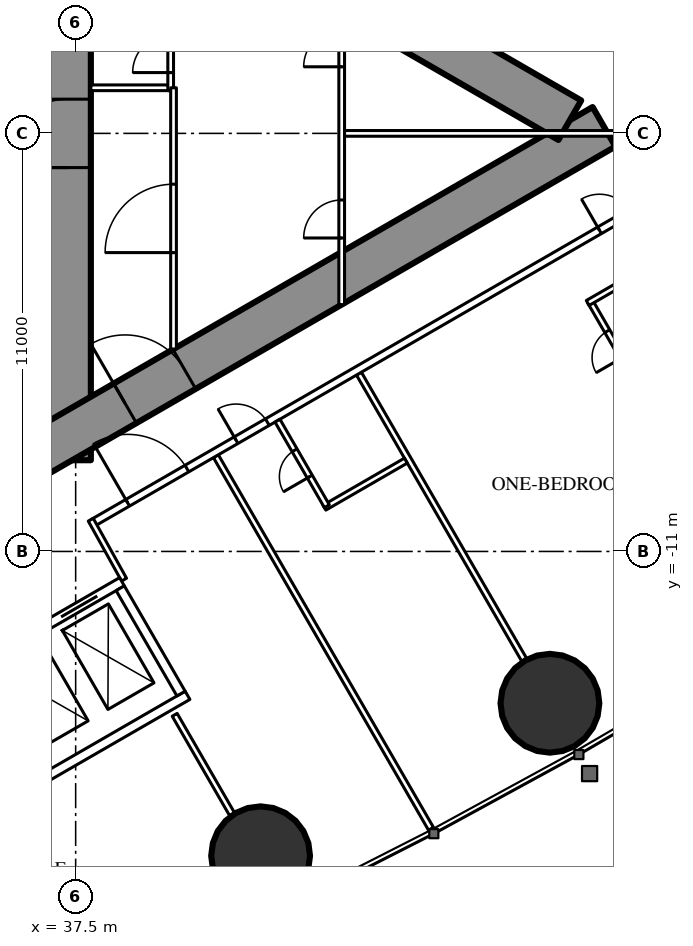
"""IFC4 building model, lengths in metres.
Left out: names, types, materials, properties, quantities, classifications, styles, units other than length and angle.
Written with IfcOpenShell. Run it as: python <this file> out.ifc"""

import sys

from ifc_helpers import new_model, si_unit, direction, frame, frame_2d, origin, origin_2d, place, context, subcontext, project, spatial, rectangle, hollow_circle, extrude, element, fill, save


model = new_model("IFC4")
c1 = context("Model", 3, precision=1e-05, world=origin(), true_north=direction((0.0, 1.0)))
c2 = subcontext(c1, "Body", "Model", "MODEL_VIEW")
j1 = project(units=[si_unit("LENGTHUNIT", "METRE"), si_unit("PLANEANGLEUNIT", "RADIAN")], contexts=[c1])
p1 = place(None, origin())
s1 = spatial("IfcSite", under=j1, at=p1, CompositionType="ELEMENT")
p2 = place(p1, origin())
s2 = spatial("IfcBuilding", under=s1, at=p2, CompositionType="ELEMENT")
p3 = place(p2, frame((0.0, 0.0, 111.6)))
s3 = spatial("IfcBuildingStorey", under=s2, at=p3, CompositionType="ELEMENT", Elevation=111.6)
for number, where, z_axis, x_axis in (
    (1, (42.366, -19.007, 0.0), (0.0, 0.0, 1.0), (1.0, 0.0, 0.0)),
    (2, (49.979, -14.994, 0.0), (0.0, 0.0, 1.0), (1.0, 0.0, 0.0)),
):
    element("IfcColumn", number, at=place(p3, frame(where, z_axis=z_axis, x_axis=x_axis)), inside=s3, PredefinedType="COLUMN", context=c2, shape_type="SweptSolid", body=[
        extrude(hollow_circle(Radius=1.3, WallThickness=0.1, at=origin_2d()), origin(), (0.0, 0.0, 1.0), 3.5),
    ])
p4 = place(p3, frame((37.3, -8.6, 0.0), z_axis=(0.0, 0.0, 1.0), x_axis=(0.0, 1.0, 0.0)))
e3 = element("IfcWall", 3, at=p4, inside=s3, PredefinedType="SHEAR", context=c2, shape_type="SweptSolid", body=[
    extrude(rectangle(XDim=17.2, YDim=1.2, at=frame_2d((8.6, 0.0))), origin(), (0.0, 0.0, 1.0), 3.5),
])
p5 = place(p4, frame((7.7, 0.0, 0.0)))
e4 = element("IfcOpeningElement", 4, at=p5, cuts=e3, PredefinedType="OPENING", context=c2, shape_type="SweptSolid", body=[
    extrude(rectangle(XDim=1.8, YDim=2.2, at=frame_2d((0.9, 1.1))), frame((0.0, 0.61, 0.0), z_axis=(0.0, -1.0, 0.0), x_axis=(1.0, 0.0, 0.0)), (0.0, 0.0, 1.0), 1.22),
])
p6 = place(p3, frame((27.2, -13.8, 0.0), z_axis=(0.0, 0.0, 1.0), x_axis=(0.866027159892, 0.499996958321, 0.0)))
e5 = element("IfcWall", 5, at=p6, inside=s3, PredefinedType="SHEAR", context=c2, shape_type="SweptSolid", body=[
    extrude(rectangle(XDim=27.947, YDim=1.2, at=frame_2d((13.973, 0.0))), origin(), (0.0, 0.0, 1.0), 3.5),
])
p7 = place(p6, frame((4.6, 0.0, 0.0)))
e6 = element("IfcOpeningElement", 6, at=p7, cuts=e5, PredefinedType="OPENING", context=c2, shape_type="SweptSolid", body=[
    extrude(rectangle(XDim=1.0, YDim=2.2, at=frame_2d((0.5, 1.1))), frame((0.0, 0.61, 0.0), z_axis=(0.0, -1.0, 0.0), x_axis=(1.0, 0.0, 0.0)), (0.0, 0.0, 1.0), 1.22),
])
p8 = place(p6, frame((13.395, 0.0, 0.0)))
e7 = element("IfcOpeningElement", 7, at=p8, cuts=e5, PredefinedType="OPENING", context=c2, shape_type="SweptSolid", body=[
    extrude(rectangle(XDim=1.8, YDim=2.2, at=frame_2d((0.9, 1.1))), frame((0.0, 0.61, 0.0), z_axis=(0.0, -1.0, 0.0), x_axis=(1.0, 0.0, 0.0)), (0.0, 0.0, 1.0), 1.22),
])
p9 = place(p3, frame((27.2, 13.8, 0.0), z_axis=(0.0, 0.0, 1.0), x_axis=(0.866024515034, -0.500001539357, 0.0)))
e8 = element("IfcWall", 8, at=p9, inside=s3, PredefinedType="SHEAR", context=c2, shape_type="SweptSolid", body=[
    extrude(rectangle(XDim=26.907, YDim=1.2, at=frame_2d((13.454, 0.0))), origin(), (0.0, 0.0, 1.0), 3.5),
])
p10 = place(p9, frame((4.6, 0.0, 0.0)))
e9 = element("IfcOpeningElement", 9, at=p10, cuts=e8, PredefinedType="OPENING", context=c2, shape_type="SweptSolid", body=[
    extrude(rectangle(XDim=1.0, YDim=2.2, at=frame_2d((0.5, 1.1))), frame((0.0, 0.61, 0.0), z_axis=(0.0, -1.0, 0.0), x_axis=(1.0, 0.0, 0.0)), (0.0, 0.0, 1.0), 1.22),
])
p11 = place(p9, frame((13.395, 0.0, 0.0)))
e10 = element("IfcOpeningElement", 10, at=p11, cuts=e8, PredefinedType="OPENING", context=c2, shape_type="SweptSolid", body=[
    extrude(rectangle(XDim=1.8, YDim=2.2, at=frame_2d((0.9, 1.1))), frame((0.0, 0.61, 0.0), z_axis=(0.0, -1.0, 0.0), x_axis=(1.0, 0.0, 0.0)), (0.0, 0.0, 1.0), 1.22),
])
p12 = place(p3, frame((41.19, -8.494, 0.0), z_axis=(0.0, 0.0, 1.0), x_axis=(0.49999258054, -0.866029687369, 0.0)))
e11 = element("IfcWall", 11, at=p12, inside=s3, PredefinedType="PARTITIONING", context=c2, shape_type="SweptSolid", body=[
    extrude(rectangle(XDim=11.318, YDim=0.15, at=frame_2d((5.659, 0.0))), origin(), (0.0, 0.0, 1.0), 3.25),
])
p13 = place(p3, frame((44.954, -6.321, 0.0), z_axis=(0.0, 0.0, 1.0), x_axis=(0.500018676722, -0.866014620505, 0.0)))
e12 = element("IfcWall", 12, at=p13, inside=s3, PredefinedType="PARTITIONING", context=c2, shape_type="SweptSolid", body=[
    extrude(rectangle(XDim=8.704, YDim=0.15, at=frame_2d((4.352, 0.0))), origin(), (0.0, 0.0, 1.0), 2.2),
])
p14 = place(p3, frame((40.105, -15.299, 0.0), z_axis=(0.0, 0.0, 1.0), x_axis=(0.499978822259, -0.866037630414, 0.0)))
e13 = element("IfcWall", 13, at=p14, inside=s3, PredefinedType="PARTITIONING", context=c2, shape_type="SweptSolid", body=[
    extrude(rectangle(XDim=3.023, YDim=0.15, at=frame_2d((1.511, 0.0))), origin(), (0.0, 0.0, 1.0), 3.25),
])
p15 = place(p3, frame((37.96, -10.243, 0.0), z_axis=(0.0, 0.0, 1.0), x_axis=(0.866026429433, 0.499998223521, 0.0)))
e14 = element("IfcWall", 14, at=p15, inside=s3, PredefinedType="PARTITIONING", context=c2, shape_type="SweptSolid", body=[
    extrude(rectangle(XDim=20.487, YDim=0.2, at=frame_2d((10.243, 0.0))), origin(), (0.0, 0.0, 1.0), 3.25),
])
p16 = place(p15, frame((4.343, 0.0, 0.0)))
e15 = element("IfcOpeningElement", 15, at=p16, cuts=e14, PredefinedType="OPENING", context=c2, shape_type="SweptSolid", body=[
    extrude(rectangle(XDim=0.95, YDim=2.2, at=frame_2d((0.475, 1.1))), frame((0.0, 0.11, 0.0), z_axis=(0.0, -1.0, 0.0), x_axis=(1.0, 0.0, 0.0)), (0.0, 0.0, 1.0), 0.22),
])
p17 = place(p15, frame((15.385, 0.0, 0.0)))
e16 = element("IfcOpeningElement", 16, at=p17, cuts=e14, PredefinedType="OPENING", context=c2, shape_type="SweptSolid", body=[
    extrude(rectangle(XDim=0.95, YDim=2.2, at=frame_2d((0.475, 1.1))), frame((0.0, 0.11, 0.0), z_axis=(0.0, -1.0, 0.0), x_axis=(1.0, 0.0, 0.0)), (0.0, 0.0, 1.0), 0.22),
])
p18 = place(p15, frame((17.085, 0.0, 0.0)))
e17 = element("IfcOpeningElement", 17, at=p18, cuts=e14, PredefinedType="OPENING", context=c2, shape_type="SweptSolid", body=[
    extrude(rectangle(XDim=0.95, YDim=2.2, at=frame_2d((0.475, 1.1))), frame((0.0, 0.11, 0.0), z_axis=(0.0, -1.0, 0.0), x_axis=(1.0, 0.0, 0.0)), (0.0, 0.0, 1.0), 0.22),
])
p19 = place(p15, frame((1.048, 0.0, 0.0)))
e18 = element("IfcOpeningElement", 18, at=p19, cuts=e14, PredefinedType="OPENING", context=c2, shape_type="SweptSolid", body=[
    extrude(rectangle(XDim=1.8, YDim=2.2, at=frame_2d((0.9, 1.1))), frame((0.0, 0.11, 0.0), z_axis=(0.0, -1.0, 0.0), x_axis=(1.0, 0.0, 0.0)), (0.0, 0.0, 1.0), 0.22),
])
p20 = place(p3, frame((38.773, -11.742, 0.0), z_axis=(0.0, 0.0, 1.0), x_axis=(-0.485528096672, 0.8742210632, 0.0)))
e19 = element("IfcWall", 19, at=p20, inside=s3, PredefinedType="PARTITIONING", context=c2, shape_type="SweptSolid", body=[
    extrude(rectangle(XDim=1.805, YDim=0.15, at=frame_2d((0.903, 0.0))), origin(), (0.0, 0.0, 1.0), 3.25),
])
p21 = place(p3, frame((44.925, 6.222, 0.0), z_axis=(0.0, 0.0, 1.0), x_axis=(0.866025590081, -0.499999677325, 0.0)))
e20 = element("IfcWall", 20, at=p21, inside=s3, PredefinedType="PARTITIONING", context=c2, shape_type="SweptSolid", body=[
    extrude(rectangle(XDim=12.324, YDim=0.2, at=frame_2d((6.162, 0.0))), origin(), (0.0, 0.0, 1.0), 3.25),
])
p22 = place(p21, frame((9.042, 0.0, 0.0)))
e21 = element("IfcOpeningElement", 21, at=p22, cuts=e20, PredefinedType="OPENING", context=c2, shape_type="SweptSolid", body=[
    extrude(rectangle(XDim=0.95, YDim=2.2, at=frame_2d((0.475, 1.1))), frame((0.0, 0.11, 0.0), z_axis=(0.0, -1.0, 0.0), x_axis=(1.0, 0.0, 0.0)), (0.0, 0.0, 1.0), 0.22),
])
p23 = place(p21, frame((7.342, 0.0, 0.0)))
e22 = element("IfcOpeningElement", 22, at=p23, cuts=e20, PredefinedType="OPENING", context=c2, shape_type="SweptSolid", body=[
    extrude(rectangle(XDim=0.95, YDim=2.2, at=frame_2d((0.475, 1.1))), frame((0.0, 0.11, 0.0), z_axis=(0.0, -1.0, 0.0), x_axis=(1.0, 0.0, 0.0)), (0.0, 0.0, 1.0), 0.22),
])
p24 = place(p21, frame((0.6, 0.0, 0.0)))
e23 = element("IfcOpeningElement", 23, at=p24, cuts=e20, PredefinedType="OPENING", context=c2, shape_type="SweptSolid", body=[
    extrude(rectangle(XDim=0.95, YDim=2.2, at=frame_2d((0.475, 1.1))), frame((0.0, 0.11, 0.0), z_axis=(0.0, -1.0, 0.0), x_axis=(1.0, 0.0, 0.0)), (0.0, 0.0, 1.0), 0.22),
])
p25 = place(p3, frame((44.045, -9.848, 0.0), z_axis=(0.0, 0.0, 1.0), x_axis=(0.866031185235, 0.4999899861, 0.0)))
e24 = element("IfcWall", 24, at=p25, inside=s3, PredefinedType="PARTITIONING", context=c2, shape_type="SweptSolid", body=[
    extrude(rectangle(XDim=2.475, YDim=0.15, at=frame_2d((1.238, 0.0))), origin(), (0.0, 0.0, 1.0), 3.25),
])
p26 = place(p3, frame((42.81, -7.559, 0.0), z_axis=(0.0, 0.0, 1.0), x_axis=(0.499936506574, -0.866062058628, 0.0)))
e25 = element("IfcWall", 25, at=p26, inside=s3, PredefinedType="PARTITIONING", context=c2, shape_type="SweptSolid", body=[
    extrude(rectangle(XDim=2.6, YDim=0.15, at=frame_2d((1.3, 0.0))), origin(), (0.0, 0.0, 1.0), 3.25),
])
p27 = place(p26, frame((0.9, 0.0, 0.0)))
e26 = element("IfcOpeningElement", 26, at=p27, cuts=e25, PredefinedType="OPENING", context=c2, shape_type="SweptSolid", body=[
    extrude(rectangle(XDim=0.8, YDim=2.2, at=frame_2d((0.4, 1.1))), frame((0.0, 0.085, 0.0), z_axis=(0.0, -1.0, 0.0), x_axis=(1.0, 0.0, 0.0)), (0.0, 0.0, 1.0), 0.17),
])
p28 = place(p3, frame((51.038, -4.425, 0.0), z_axis=(0.0, 0.0, 1.0), x_axis=(0.49997716683, -0.86603858612, 0.0)))
e27 = element("IfcWall", 27, at=p28, inside=s3, PredefinedType="PARTITIONING", context=c2, shape_type="SweptSolid", body=[
    extrude(rectangle(XDim=2.6, YDim=0.15, at=frame_2d((1.3, 0.0))), origin(), (0.0, 0.0, 1.0), 3.25),
])
p29 = place(p28, frame((0.9, 0.0, 0.0)))
e28 = element("IfcOpeningElement", 28, at=p29, cuts=e27, PredefinedType="OPENING", context=c2, shape_type="SweptSolid", body=[
    extrude(rectangle(XDim=0.8, YDim=2.2, at=frame_2d((0.4, 1.1))), frame((0.0, 0.085, 0.0), z_axis=(0.0, -1.0, 0.0), x_axis=(1.0, 0.0, 0.0)), (0.0, 0.0, 1.0), 0.17),
])
p30 = place(p3, frame((50.973, -4.462, 0.0), z_axis=(0.0, 0.0, 1.0), x_axis=(0.866031185235, 0.4999899861, 0.0)))
e29 = element("IfcWall", 29, at=p30, inside=s3, PredefinedType="PARTITIONING", context=c2, shape_type="SweptSolid", body=[
    extrude(rectangle(XDim=2.475, YDim=0.15, at=frame_2d((1.238, 0.0))), origin(), (0.0, 0.0, 1.0), 3.25),
])
p31 = place(p3, frame((37.9, 1.2, 0.0), z_axis=(0.0, 0.0, 1.0), x_axis=(1.0, 0.0, 0.0)))
e30 = element("IfcWall", 30, at=p31, inside=s3, PredefinedType="PARTITIONING", context=c2, shape_type="SweptSolid", body=[
    extrude(rectangle(XDim=2.175, YDim=0.15, at=frame_2d((1.087, 0.0))), origin(), (0.0, 0.0, 1.0), 3.25),
])
p32 = place(p3, frame((40.0, 1.125, 0.0), z_axis=(0.0, 0.0, 1.0), x_axis=(0.0, 1.0, 0.0)))
e31 = element("IfcWall", 31, at=p32, inside=s3, PredefinedType="PARTITIONING", context=c2, shape_type="SweptSolid", body=[
    extrude(rectangle(XDim=1.95, YDim=0.15, at=frame_2d((0.975, 0.0))), origin(), (0.0, 0.0, 1.0), 3.25),
])
p33 = place(p32, frame((0.475, 0.0, 0.0)))
e32 = element("IfcOpeningElement", 32, at=p33, cuts=e31, PredefinedType="OPENING", context=c2, shape_type="SweptSolid", body=[
    extrude(rectangle(XDim=1.0, YDim=2.2, at=frame_2d((0.5, 1.1))), frame((0.0, 0.085, 0.0), z_axis=(0.0, -1.0, 0.0), x_axis=(1.0, 0.0, 0.0)), (0.0, 0.0, 1.0), 0.17),
])
p34 = place(p3, frame((40.075, -5.674, 0.0), z_axis=(0.0, 0.0, 1.0), x_axis=(0.0, 1.0, 0.0)))
e33 = element("IfcWall", 33, at=p34, inside=s3, PredefinedType="PARTITIONING", context=c2, shape_type="SweptSolid", body=[
    extrude(rectangle(XDim=6.874, YDim=0.15, at=frame_2d((3.437, 0.0))), origin(), (0.0, 0.0, 1.0), 3.25),
])
p35 = place(p34, frame((2.537, 0.0, 0.0)))
e34 = element("IfcOpeningElement", 34, at=p35, cuts=e33, PredefinedType="OPENING", context=c2, shape_type="SweptSolid", body=[
    extrude(rectangle(XDim=1.8, YDim=2.2, at=frame_2d((0.9, 1.1))), frame((0.0, 0.085, 0.0), z_axis=(0.0, -1.0, 0.0), x_axis=(1.0, 0.0, 0.0)), (0.0, 0.0, 1.0), 0.17),
])
p36 = place(p3, frame((44.5, -4.505, 0.0), z_axis=(0.0, 0.0, 1.0), x_axis=(0.0, 1.0, 0.0)))
e35 = element("IfcWall", 35, at=p36, inside=s3, PredefinedType="PARTITIONING", context=c2, shape_type="SweptSolid", body=[
    extrude(rectangle(XDim=9.009, YDim=0.15, at=frame_2d((4.505, 0.0))), origin(), (0.0, 0.0, 1.0), 2.45),
])
p37 = place(p36, frame((1.752, 0.0, 0.0)))
e36 = element("IfcOpeningElement", 36, at=p37, cuts=e35, PredefinedType="OPENING", context=c2, shape_type="SweptSolid", body=[
    extrude(rectangle(XDim=1.0, YDim=2.2, at=frame_2d((0.5, 1.1))), frame((0.0, 0.085, 0.0), z_axis=(0.0, -1.0, 0.0), x_axis=(1.0, 0.0, 0.0)), (0.0, 0.0, 1.0), 0.17),
])
p38 = place(p36, frame((6.257, 0.0, 0.0)))
e37 = element("IfcOpeningElement", 37, at=p38, cuts=e35, PredefinedType="OPENING", context=c2, shape_type="SweptSolid", body=[
    extrude(rectangle(XDim=1.0, YDim=2.2, at=frame_2d((0.5, 1.1))), frame((0.0, 0.085, 0.0), z_axis=(0.0, -1.0, 0.0), x_axis=(1.0, 0.0, 0.0)), (0.0, 0.0, 1.0), 0.17),
])
p39 = place(p3, frame((44.575, 0.0, 0.0), z_axis=(0.0, 0.0, 1.0), x_axis=(1.0, 0.0, 0.0)))
e38 = element("IfcWall", 38, at=p39, inside=s3, PredefinedType="PARTITIONING", context=c2, shape_type="SweptSolid", body=[
    extrude(rectangle(XDim=7.727, YDim=0.15, at=frame_2d((3.864, 0.0))), origin(), (0.0, 0.0, 1.0), 2.2),
])
p40 = place(p3, frame((31.271, -16.097, 0.0), z_axis=(0.0, 0.0, 1.0), x_axis=(0.86604045752, 0.499973925258, 0.0)))
e39 = element("IfcWall", 39, at=p40, inside=s3, PredefinedType="PARTITIONING", context=c2, shape_type="SweptSolid", body=[
    extrude(rectangle(XDim=8.6, YDim=0.25, at=frame_2d((4.3, 0.0))), origin(), (0.0, 0.0, 1.0), 3.25),
])
p41 = place(p40, frame((0.75, 0.0, 0.0)))
e40 = element("IfcOpeningElement", 40, at=p41, cuts=e39, PredefinedType="OPENING", context=c2, shape_type="SweptSolid", body=[
    extrude(rectangle(XDim=1.1, YDim=2.2, at=frame_2d((0.55, 1.1))), frame((0.0, 0.135, 0.0), z_axis=(0.0, -1.0, 0.0), x_axis=(1.0, 0.0, 0.0)), (0.0, 0.0, 1.0), 0.27),
])
p42 = place(p40, frame((2.75, 0.0, 0.0)))
e41 = element("IfcOpeningElement", 41, at=p42, cuts=e39, PredefinedType="OPENING", context=c2, shape_type="SweptSolid", body=[
    extrude(rectangle(XDim=1.1, YDim=2.2, at=frame_2d((0.55, 1.1))), frame((0.0, 0.135, 0.0), z_axis=(0.0, -1.0, 0.0), x_axis=(1.0, 0.0, 0.0)), (0.0, 0.0, 1.0), 0.27),
])
p43 = place(p40, frame((4.75, 0.0, 0.0)))
e42 = element("IfcOpeningElement", 42, at=p43, cuts=e39, PredefinedType="OPENING", context=c2, shape_type="SweptSolid", body=[
    extrude(rectangle(XDim=1.1, YDim=2.2, at=frame_2d((0.55, 1.1))), frame((0.0, 0.135, 0.0), z_axis=(0.0, -1.0, 0.0), x_axis=(1.0, 0.0, 0.0)), (0.0, 0.0, 1.0), 0.27),
])
p44 = place(p40, frame((6.75, 0.0, 0.0)))
e43 = element("IfcOpeningElement", 43, at=p44, cuts=e39, PredefinedType="OPENING", context=c2, shape_type="SweptSolid", body=[
    extrude(rectangle(XDim=1.1, YDim=2.2, at=frame_2d((0.55, 1.1))), frame((0.0, 0.135, 0.0), z_axis=(0.0, -1.0, 0.0), x_axis=(1.0, 0.0, 0.0)), (0.0, 0.0, 1.0), 0.27),
])
p45 = place(p3, frame((32.996, -19.086, 0.0), z_axis=(0.0, 0.0, 1.0), x_axis=(0.866028165386, 0.499995216735, 0.0)))
e44 = element("IfcWall", 44, at=p45, inside=s3, PredefinedType="PARTITIONING", context=c2, shape_type="SweptSolid", body=[
    extrude(rectangle(XDim=8.6, YDim=0.25, at=frame_2d((4.3, 0.0))), origin(), (0.0, 0.0, 1.0), 3.25),
])
p46 = place(p3, frame((38.673, -11.968, 0.0), z_axis=(0.0, 0.0, 1.0), x_axis=(0.499929347863, -0.866066190972, 0.0)))
e45 = element("IfcWall", 45, at=p46, inside=s3, PredefinedType="PARTITIONING", context=c2, shape_type="SweptSolid", body=[
    extrude(rectangle(XDim=3.201, YDim=0.25, at=frame_2d((1.6, 0.0))), origin(), (0.0, 0.0, 1.0), 3.25),
])
p47 = place(p27, origin())
e46 = element("IfcDoor", 46, at=p47, inside=s3, OperationType="SINGLE_SWING_RIGHT", PredefinedType="DOOR", context=c2, shape_type="SweptSolid", body=[
    extrude(rectangle(XDim=0.8, YDim=2.2, at=frame_2d((0.4, 1.1))), frame((0.0, 0.025, 0.0), z_axis=(0.0, -1.0, 0.0), x_axis=(1.0, 0.0, 0.0)), (0.0, 0.0, 1.0), 0.05),
])
fill(e26, e46)
p48 = place(p16, origin())
e47 = element("IfcDoor", 47, at=p48, inside=s3, OperationType="SINGLE_SWING_LEFT", PredefinedType="DOOR", context=c2, shape_type="SweptSolid", body=[
    extrude(rectangle(XDim=0.95, YDim=2.2, at=frame_2d((0.475, 1.1))), frame((0.0, 0.025, 0.0), z_axis=(0.0, -1.0, 0.0), x_axis=(1.0, 0.0, 0.0)), (0.0, 0.0, 1.0), 0.05),
])
fill(e15, e47)
p49 = place(p29, origin())
e48 = element("IfcDoor", 48, at=p49, inside=s3, OperationType="SINGLE_SWING_RIGHT", PredefinedType="DOOR", context=c2, shape_type="SweptSolid", body=[
    extrude(rectangle(XDim=0.8, YDim=2.2, at=frame_2d((0.4, 1.1))), frame((0.0, 0.025, 0.0), z_axis=(0.0, -1.0, 0.0), x_axis=(1.0, 0.0, 0.0)), (0.0, 0.0, 1.0), 0.05),
])
fill(e28, e48)
p50 = place(p17, origin())
e49 = element("IfcDoor", 49, at=p50, inside=s3, OperationType="SINGLE_SWING_LEFT", PredefinedType="DOOR", context=c2, shape_type="SweptSolid", body=[
    extrude(rectangle(XDim=0.95, YDim=2.2, at=frame_2d((0.475, 1.1))), frame((0.0, 0.025, 0.0), z_axis=(0.0, -1.0, 0.0), x_axis=(1.0, 0.0, 0.0)), (0.0, 0.0, 1.0), 0.05),
])
fill(e16, e49)
p51 = place(p23, origin())
e50 = element("IfcDoor", 50, at=p51, inside=s3, OperationType="SINGLE_SWING_LEFT", PredefinedType="DOOR", context=c2, shape_type="SweptSolid", body=[
    extrude(rectangle(XDim=0.95, YDim=2.2, at=frame_2d((0.475, 1.1))), frame((0.0, 0.025, 0.0), z_axis=(0.0, -1.0, 0.0), x_axis=(1.0, 0.0, 0.0)), (0.0, 0.0, 1.0), 0.05),
])
fill(e22, e50)
p52 = place(p19, origin())
e51 = element("IfcDoor", 51, at=p52, inside=s3, OperationType="DOUBLE_DOOR_SINGLE_SWING", PredefinedType="DOOR", context=c2, shape_type="SweptSolid", body=[
    extrude(rectangle(XDim=1.8, YDim=2.2, at=frame_2d((0.9, 1.1))), frame((0.0, 0.025, 0.0), z_axis=(0.0, -1.0, 0.0), x_axis=(1.0, 0.0, 0.0)), (0.0, 0.0, 1.0), 0.05),
])
fill(e18, e51)
p53 = place(p33, origin())
e52 = element("IfcDoor", 52, at=p53, inside=s3, OperationType="SINGLE_SWING_LEFT", PredefinedType="DOOR", context=c2, shape_type="SweptSolid", body=[
    extrude(rectangle(XDim=1.0, YDim=2.2, at=frame_2d((0.5, 1.1))), frame((0.0, 0.025, 0.0), z_axis=(0.0, -1.0, 0.0), x_axis=(1.0, 0.0, 0.0)), (0.0, 0.0, 1.0), 0.05),
])
fill(e32, e52)
p54 = place(p35, origin())
e53 = element("IfcDoor", 53, at=p54, inside=s3, OperationType="DOUBLE_DOOR_SINGLE_SWING", PredefinedType="DOOR", context=c2, shape_type="SweptSolid", body=[
    extrude(rectangle(XDim=1.8, YDim=2.2, at=frame_2d((0.9, 1.1))), frame((0.0, 0.025, 0.0), z_axis=(0.0, -1.0, 0.0), x_axis=(1.0, 0.0, 0.0)), (0.0, 0.0, 1.0), 0.05),
])
fill(e34, e53)
p55 = place(p37, origin())
e54 = element("IfcDoor", 54, at=p55, inside=s3, OperationType="SINGLE_SWING_LEFT", PredefinedType="DOOR", context=c2, shape_type="SweptSolid", body=[
    extrude(rectangle(XDim=1.0, YDim=2.2, at=frame_2d((0.5, 1.1))), frame((0.0, 0.025, 0.0), z_axis=(0.0, -1.0, 0.0), x_axis=(1.0, 0.0, 0.0)), (0.0, 0.0, 1.0), 0.05),
])
fill(e36, e54)
p56 = place(p38, origin())
e55 = element("IfcDoor", 55, at=p56, inside=s3, OperationType="SINGLE_SWING_LEFT", PredefinedType="DOOR", context=c2, shape_type="SweptSolid", body=[
    extrude(rectangle(XDim=1.0, YDim=2.2, at=frame_2d((0.5, 1.1))), frame((0.0, 0.025, 0.0), z_axis=(0.0, -1.0, 0.0), x_axis=(1.0, 0.0, 0.0)), (0.0, 0.0, 1.0), 0.05),
])
fill(e37, e55)
p57 = place(p8, origin())
e56 = element("IfcDoor", 56, at=p57, inside=s3, OperationType="DOUBLE_DOOR_SINGLE_SWING", PredefinedType="DOOR", context=c2, shape_type="SweptSolid", body=[
    extrude(rectangle(XDim=1.8, YDim=2.2, at=frame_2d((0.9, 1.1))), frame((0.0, 0.025, 0.0), z_axis=(0.0, -1.0, 0.0), x_axis=(1.0, 0.0, 0.0)), (0.0, 0.0, 1.0), 0.05),
])
fill(e7, e56)
p58 = place(p5, origin())
e57 = element("IfcDoor", 57, at=p58, inside=s3, OperationType="DOUBLE_DOOR_SINGLE_SWING", PredefinedType="DOOR", context=c2, shape_type="SweptSolid", body=[
    extrude(rectangle(XDim=1.8, YDim=2.2, at=frame_2d((0.9, 1.1))), frame((0.0, 0.025, 0.0), z_axis=(0.0, -1.0, 0.0), x_axis=(1.0, 0.0, 0.0)), (0.0, 0.0, 1.0), 0.05),
])
fill(e4, e57)
p59 = place(p44, origin())
e58 = element("IfcDoor", 58, at=p59, inside=s3, OperationType="DOUBLE_DOOR_SLIDING", PredefinedType="USERDEFINED", context=c2, shape_type="SweptSolid", body=[
    extrude(rectangle(XDim=1.1, YDim=2.2, at=frame_2d((0.55, 1.1))), frame((0.0, 0.025, 0.0), z_axis=(0.0, -1.0, 0.0), x_axis=(1.0, 0.0, 0.0)), (0.0, 0.0, 1.0), 0.05),
])
fill(e43, e58)
save(model, sys.argv[1])
